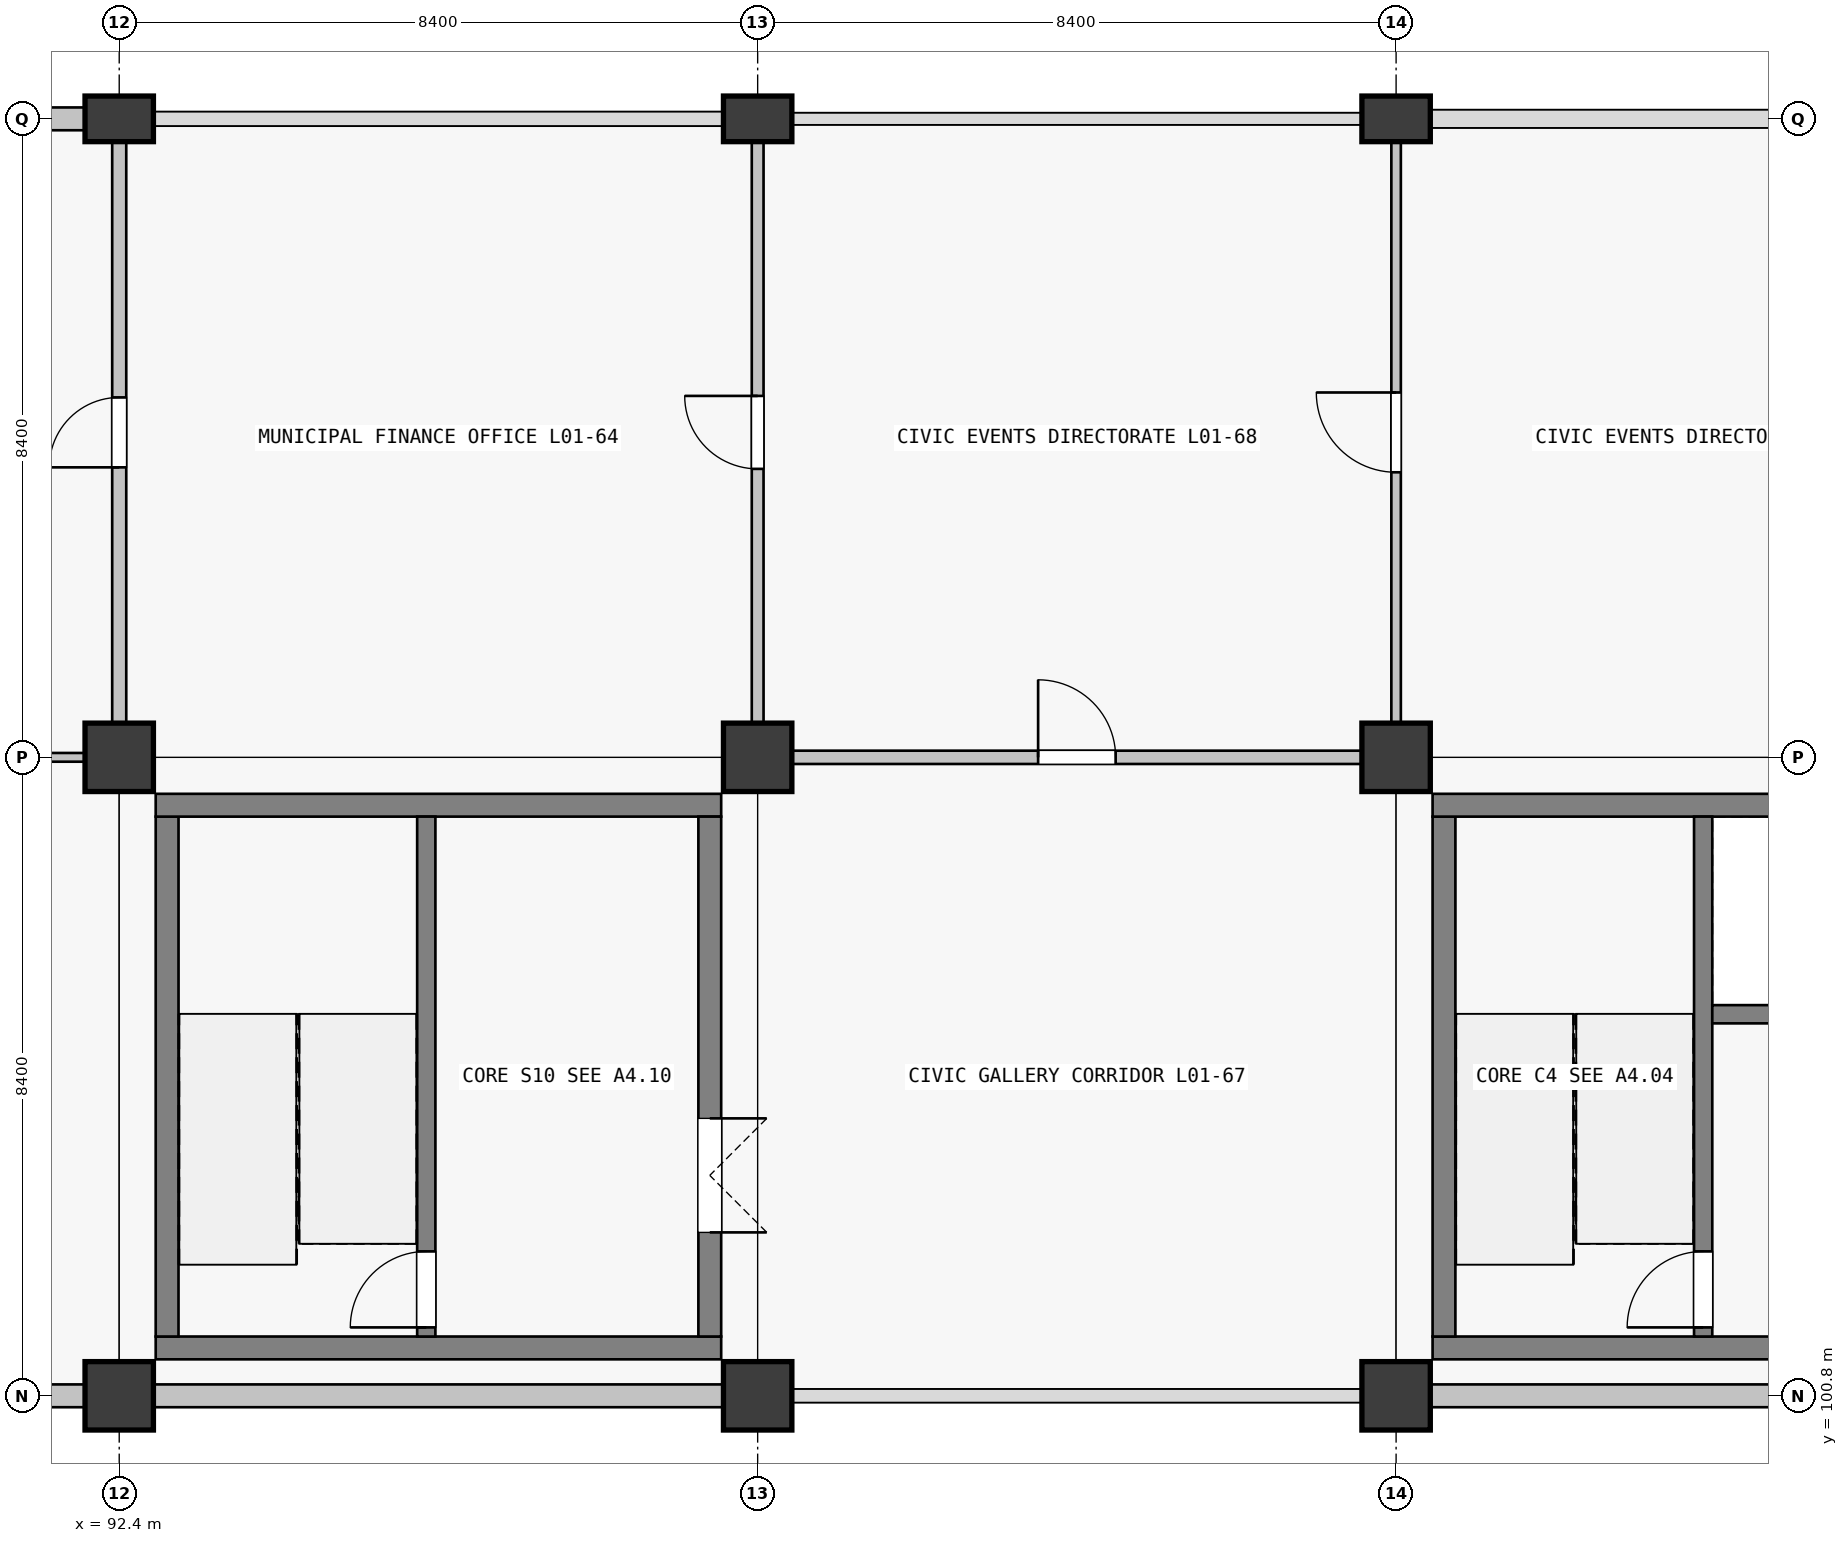
"""IFC4 building model, lengths in metres.
Left out: names, types, materials, properties, quantities, classifications, styles, units other than length and angle.
Written with IfcOpenShell. Run it as: python <this file> out.ifc"""

import sys

from ifc_helpers import new_model, si_unit, direction, frame, frame_2d, origin, origin_2d, place, context, subcontext, project, spatial, rectangle, extrude, element, fill, save


model = new_model("IFC4")
c1 = context("Model", 3, precision=1e-05, world=origin(), true_north=direction((0.0, 1.0)))
c2 = subcontext(c1, "Body", "Model", "MODEL_VIEW")
j1 = project(units=[si_unit("LENGTHUNIT", "METRE"), si_unit("PLANEANGLEUNIT", "RADIAN")], contexts=[c1])
p1 = place(None, origin())
s1 = spatial("IfcSite", under=j1, at=p1, CompositionType="ELEMENT")
p2 = place(p1, origin())
s2 = spatial("IfcBuilding", under=s1, at=p2, CompositionType="ELEMENT")
p3 = place(p2, frame((0.0, 0.0, 5.76)))
s3 = spatial("IfcBuildingStorey", under=s2, at=p3, CompositionType="ELEMENT", Elevation=5.76)
for number, where, z_axis, x_axis in (
    (1, (92.4, 100.8, 0.0), (0.0, 0.0, 1.0), (1.0, 0.0, 0.0)),
    (2, (92.4, 109.2, 0.0), (0.0, 0.0, 1.0), (1.0, 0.0, 0.0)),
):
    element("IfcColumn", number, at=place(p3, frame(where, z_axis=z_axis, x_axis=x_axis)), inside=s3, PredefinedType="COLUMN", context=c2, shape_type="SweptSolid", body=[
        extrude(rectangle(XDim=0.9, YDim=0.9, at=origin_2d()), origin(), (0.0, 0.0, 1.0), 4.5),
    ])
p4 = place(p3, frame((92.4, 117.6, 0.0), z_axis=(0.0, 0.0, 1.0), x_axis=(1.0, 0.0, 0.0)))
e3 = element("IfcColumn", 3, at=p4, inside=s3, PredefinedType="COLUMN", context=c2, shape_type="SweptSolid", body=[
    extrude(rectangle(XDim=0.9, YDim=0.6, at=origin_2d()), origin(), (0.0, 0.0, 1.0), 4.5),
])
for number, where, z_axis, x_axis in (
    (4, (100.8, 100.8, 0.0), (0.0, 0.0, 1.0), (1.0, 0.0, 0.0)),
    (5, (100.8, 109.2, 0.0), (0.0, 0.0, 1.0), (1.0, 0.0, 0.0)),
):
    element("IfcColumn", number, at=place(p3, frame(where, z_axis=z_axis, x_axis=x_axis)), inside=s3, PredefinedType="COLUMN", context=c2, shape_type="SweptSolid", body=[
        extrude(rectangle(XDim=0.9, YDim=0.9, at=origin_2d()), origin(), (0.0, 0.0, 1.0), 4.5),
    ])
p5 = place(p3, frame((100.8, 117.6, 0.0), z_axis=(0.0, 0.0, 1.0), x_axis=(1.0, 0.0, 0.0)))
e6 = element("IfcColumn", 6, at=p5, inside=s3, PredefinedType="COLUMN", context=c2, shape_type="SweptSolid", body=[
    extrude(rectangle(XDim=0.9, YDim=0.6, at=origin_2d()), origin(), (0.0, 0.0, 1.0), 4.5),
])
for number, where, z_axis, x_axis in (
    (7, (109.2, 100.8, 0.0), (0.0, 0.0, 1.0), (1.0, 0.0, 0.0)),
    (8, (109.2, 109.2, 0.0), (0.0, 0.0, 1.0), (1.0, 0.0, 0.0)),
):
    element("IfcColumn", number, at=place(p3, frame(where, z_axis=z_axis, x_axis=x_axis)), inside=s3, PredefinedType="COLUMN", context=c2, shape_type="SweptSolid", body=[
        extrude(rectangle(XDim=0.9, YDim=0.9, at=origin_2d()), origin(), (0.0, 0.0, 1.0), 4.5),
    ])
p6 = place(p3, frame((109.2, 117.6, 0.0), z_axis=(0.0, 0.0, 1.0), x_axis=(1.0, 0.0, 0.0)))
e9 = element("IfcColumn", 9, at=p6, inside=s3, PredefinedType="COLUMN", context=c2, shape_type="SweptSolid", body=[
    extrude(rectangle(XDim=0.9, YDim=0.6, at=origin_2d()), origin(), (0.0, 0.0, 1.0), 4.5),
])
p7 = place(p3, frame((91.949, 100.8, 0.0), z_axis=(0.0, 0.0, 1.0), x_axis=(-1.0, 0.0, 0.0)))
e10 = element("IfcWall", 10, at=p7, inside=s3, PredefinedType="SOLIDWALL", context=c2, shape_type="SweptSolid", body=[
    extrude(rectangle(XDim=7.498, YDim=0.3, at=frame_2d((3.749, 0.0))), origin(), (0.0, 0.0, 1.0), 3.4),
])
p8 = place(p7, frame((2.249, 0.0, 0.9)))
e11 = element("IfcOpeningElement", 11, at=p8, cuts=e10, PredefinedType="OPENING", context=c2, shape_type="SweptSolid", body=[
    extrude(rectangle(XDim=3.0, YDim=1.2, at=frame_2d((1.5, 0.6))), frame((0.0, 0.15, 0.0), z_axis=(0.0, -1.0, 0.0), x_axis=(1.0, 0.0, 0.0)), (0.0, 0.0, 1.0), 0.3),
])
p9 = place(p3, frame((84.451, 117.6, 0.0), z_axis=(0.0, 0.0, 1.0), x_axis=(1.0, 0.0, 0.0)))
e12 = element("IfcWall", 12, at=p9, inside=s3, PredefinedType="SOLIDWALL", context=c2, shape_type="SweptSolid", body=[
    extrude(rectangle(XDim=7.498, YDim=0.3, at=frame_2d((3.749, 0.0))), origin(), (0.0, 0.0, 1.0), 3.4),
])
p10 = place(p9, frame((2.399, 0.0, 0.9)))
e13 = element("IfcOpeningElement", 13, at=p10, cuts=e12, PredefinedType="OPENING", context=c2, shape_type="SweptSolid", body=[
    extrude(rectangle(XDim=2.7, YDim=1.2, at=frame_2d((1.35, 0.6))), frame((0.0, 0.15, 0.0), z_axis=(0.0, -1.0, 0.0), x_axis=(1.0, 0.0, 0.0)), (0.0, 0.0, 1.0), 0.3),
])
for number, where, z_axis, x_axis in (
    (14, (100.349, 100.8, 0.0), (0.0, 0.0, 1.0), (-1.0, 0.0, 0.0)),
    (15, (117.149, 100.8, 0.0), (0.0, 0.0, 1.0), (-1.0, 0.0, 0.0)),
):
    element("IfcWall", number, at=place(p3, frame(where, z_axis=z_axis, x_axis=x_axis)), inside=s3, PredefinedType="SOLIDWALL", context=c2, shape_type="SweptSolid", body=[
        extrude(rectangle(XDim=7.498, YDim=0.3, at=frame_2d((3.749, 0.0))), origin(), (0.0, 0.0, 1.0), 3.4),
    ])
p11 = place(p3, frame((117.12, 101.43, 0.0), z_axis=(0.0, 0.0, 1.0), x_axis=(-1.0, 0.0, 0.0)))
e16 = element("IfcWall", 16, at=p11, inside=s3, PredefinedType="SHEAR", context=c2, shape_type="SweptSolid", body=[
    extrude(rectangle(XDim=7.44, YDim=0.3, at=frame_2d((3.72, 0.0))), origin(), (0.0, 0.0, 1.0), 4.5),
])
p12 = place(p3, frame((109.83, 101.58, 0.0), z_axis=(0.0, 0.0, 1.0), x_axis=(0.0, 1.0, 0.0)))
e17 = element("IfcWall", 17, at=p12, inside=s3, PredefinedType="SHEAR", context=c2, shape_type="SweptSolid", body=[
    extrude(rectangle(XDim=6.84, YDim=0.3, at=frame_2d((3.42, 0.0))), origin(), (0.0, 0.0, 1.0), 4.5),
])
p13 = place(p3, frame((109.68, 108.57, 0.0), z_axis=(0.0, 0.0, 1.0), x_axis=(1.0, 0.0, 0.0)))
e18 = element("IfcWall", 18, at=p13, inside=s3, PredefinedType="SHEAR", context=c2, shape_type="SweptSolid", body=[
    extrude(rectangle(XDim=7.44, YDim=0.3, at=frame_2d((3.72, 0.0))), origin(), (0.0, 0.0, 1.0), 4.5),
])
p14 = place(p3, frame((113.24, 101.58, 0.0), z_axis=(0.0, 0.0, 1.0), x_axis=(0.0, 1.0, 0.0)))
e19 = element("IfcWall", 19, at=p14, inside=s3, PredefinedType="SHEAR", context=c2, shape_type="SweptSolid", body=[
    extrude(rectangle(XDim=6.84, YDim=0.24, at=frame_2d((3.42, 0.0))), origin(), (0.0, 0.0, 1.0), 4.5),
])
p15 = place(p14, frame((0.12, 0.0, 0.0)))
e20 = element("IfcOpeningElement", 20, at=p15, cuts=e19, PredefinedType="OPENING", context=c2, shape_type="SweptSolid", body=[
    extrude(rectangle(XDim=1.0, YDim=2.15, at=frame_2d((0.5, 1.075))), frame((0.0, 0.12, 0.0), z_axis=(0.0, -1.0, 0.0), x_axis=(1.0, 0.0, 0.0)), (0.0, 0.0, 1.0), 0.24),
])
p16 = place(p3, frame((113.36, 105.82, 0.0), z_axis=(0.0, 0.0, 1.0), x_axis=(1.0, 0.0, 0.0)))
e21 = element("IfcWall", 21, at=p16, inside=s3, PredefinedType="SHEAR", context=c2, shape_type="SweptSolid", body=[
    extrude(rectangle(XDim=3.46, YDim=0.24, at=frame_2d((1.73, 0.0))), origin(), (0.0, 0.0, 1.0), 4.5),
])
p17 = place(p16, frame((1.13, 0.0, 0.0)))
e22 = element("IfcOpeningElement", 22, at=p17, cuts=e21, PredefinedType="OPENING", context=c2, shape_type="SweptSolid", body=[
    extrude(rectangle(XDim=1.2, YDim=2.2, at=frame_2d((0.6, 1.1))), frame((0.0, 0.12, 0.0), z_axis=(0.0, -1.0, 0.0), x_axis=(1.0, 0.0, 0.0)), (0.0, 0.0, 1.0), 0.24),
])
p18 = place(p3, frame((100.32, 101.43, 0.0), z_axis=(0.0, 0.0, 1.0), x_axis=(-1.0, 0.0, 0.0)))
e23 = element("IfcWall", 23, at=p18, inside=s3, PredefinedType="SHEAR", context=c2, shape_type="SweptSolid", body=[
    extrude(rectangle(XDim=7.44, YDim=0.3, at=frame_2d((3.72, 0.0))), origin(), (0.0, 0.0, 1.0), 4.5),
])
p19 = place(p3, frame((93.03, 101.58, 0.0), z_axis=(0.0, 0.0, 1.0), x_axis=(0.0, 1.0, 0.0)))
e24 = element("IfcWall", 24, at=p19, inside=s3, PredefinedType="SHEAR", context=c2, shape_type="SweptSolid", body=[
    extrude(rectangle(XDim=6.84, YDim=0.3, at=frame_2d((3.42, 0.0))), origin(), (0.0, 0.0, 1.0), 4.5),
])
p20 = place(p3, frame((92.88, 108.57, 0.0), z_axis=(0.0, 0.0, 1.0), x_axis=(1.0, 0.0, 0.0)))
e25 = element("IfcWall", 25, at=p20, inside=s3, PredefinedType="SHEAR", context=c2, shape_type="SweptSolid", body=[
    extrude(rectangle(XDim=7.44, YDim=0.3, at=frame_2d((3.72, 0.0))), origin(), (0.0, 0.0, 1.0), 4.5),
])
p21 = place(p3, frame((100.17, 108.42, 0.0), z_axis=(0.0, 0.0, 1.0), x_axis=(0.0, -1.0, 0.0)))
e26 = element("IfcWall", 26, at=p21, inside=s3, PredefinedType="SHEAR", context=c2, shape_type="SweptSolid", body=[
    extrude(rectangle(XDim=6.84, YDim=0.3, at=frame_2d((3.42, 0.0))), origin(), (0.0, 0.0, 1.0), 4.5),
])
p22 = place(p21, frame((3.97, 0.0, 0.0)))
e27 = element("IfcOpeningElement", 27, at=p22, cuts=e26, PredefinedType="OPENING", context=c2, shape_type="SweptSolid", body=[
    extrude(rectangle(XDim=1.5, YDim=2.15, at=frame_2d((0.75, 1.075))), frame((0.0, 0.15, 0.0), z_axis=(0.0, -1.0, 0.0), x_axis=(1.0, 0.0, 0.0)), (0.0, 0.0, 1.0), 0.3),
])
p23 = place(p3, frame((96.44, 101.58, 0.0), z_axis=(0.0, 0.0, 1.0), x_axis=(0.0, 1.0, 0.0)))
e28 = element("IfcWall", 28, at=p23, inside=s3, PredefinedType="SHEAR", context=c2, shape_type="SweptSolid", body=[
    extrude(rectangle(XDim=6.84, YDim=0.24, at=frame_2d((3.42, 0.0))), origin(), (0.0, 0.0, 1.0), 4.5),
])
p24 = place(p23, frame((0.12, 0.0, 0.0)))
e29 = element("IfcOpeningElement", 29, at=p24, cuts=e28, PredefinedType="OPENING", context=c2, shape_type="SweptSolid", body=[
    extrude(rectangle(XDim=1.0, YDim=2.15, at=frame_2d((0.5, 1.075))), frame((0.0, 0.12, 0.0), z_axis=(0.0, -1.0, 0.0), x_axis=(1.0, 0.0, 0.0)), (0.0, 0.0, 1.0), 0.24),
])
p25 = place(p3, frame((84.452, 109.2, 0.0), z_axis=(0.0, 0.0, 1.0), x_axis=(1.0, 0.0, 0.0)))
e30 = element("IfcWall", 30, at=p25, inside=s3, PredefinedType="PARTITIONING", context=c2, shape_type="SweptSolid", body=[
    extrude(rectangle(XDim=7.496, YDim=0.115, at=frame_2d((3.748, 0.0))), origin(), (0.0, 0.0, 1.0), 2.4),
])
p26 = place(p25, frame((3.218, 0.0, 0.0)))
e31 = element("IfcOpeningElement", 31, at=p26, cuts=e30, PredefinedType="OPENING", context=c2, shape_type="SweptSolid", body=[
    extrude(rectangle(XDim=1.06, YDim=2.22, at=frame_2d((0.53, 1.11))), frame((0.0, 0.058, 0.0), z_axis=(0.0, -1.0, 0.0), x_axis=(1.0, 0.0, 0.0)), (0.0, 0.0, 1.0), 0.115),
])
p27 = place(p3, frame((101.252, 109.2, 0.0), z_axis=(0.0, 0.0, 1.0), x_axis=(1.0, 0.0, 0.0)))
e32 = element("IfcWall", 32, at=p27, inside=s3, PredefinedType="PARTITIONING", context=c2, shape_type="SweptSolid", body=[
    extrude(rectangle(XDim=7.496, YDim=0.175, at=frame_2d((3.748, 0.0))), origin(), (0.0, 0.0, 1.0), 2.4),
])
p28 = place(p27, frame((3.238, 0.0, 0.0)))
e33 = element("IfcOpeningElement", 33, at=p28, cuts=e32, PredefinedType="OPENING", context=c2, shape_type="SweptSolid", body=[
    extrude(rectangle(XDim=1.02, YDim=2.2, at=frame_2d((0.51, 1.1))), frame((0.0, 0.087, 0.0), z_axis=(0.0, -1.0, 0.0), x_axis=(1.0, 0.0, 0.0)), (0.0, 0.0, 1.0), 0.175),
])
p29 = place(p3, frame((92.4, 109.652, 0.0), z_axis=(0.0, 0.0, 1.0), x_axis=(0.0, 1.0, 0.0)))
e34 = element("IfcWall", 34, at=p29, inside=s3, PredefinedType="PARTITIONING", context=c2, shape_type="SweptSolid", body=[
    extrude(rectangle(XDim=7.646, YDim=0.185, at=frame_2d((3.823, 0.0))), origin(), (0.0, 0.0, 1.0), 2.4),
])
p30 = place(p29, frame((3.363, 0.0, 0.0)))
e35 = element("IfcOpeningElement", 35, at=p30, cuts=e34, PredefinedType="OPENING", context=c2, shape_type="SweptSolid", body=[
    extrude(rectangle(XDim=0.92, YDim=2.15, at=frame_2d((0.46, 1.075))), frame((0.0, 0.093, 0.0), z_axis=(0.0, -1.0, 0.0), x_axis=(1.0, 0.0, 0.0)), (0.0, 0.0, 1.0), 0.185),
])
p31 = place(p3, frame((100.8, 109.652, 0.0), z_axis=(0.0, 0.0, 1.0), x_axis=(0.0, 1.0, 0.0)))
e36 = element("IfcWall", 36, at=p31, inside=s3, PredefinedType="PARTITIONING", context=c2, shape_type="SweptSolid", body=[
    extrude(rectangle(XDim=7.646, YDim=0.155, at=frame_2d((3.823, 0.0))), origin(), (0.0, 0.0, 1.0), 2.4),
])
p32 = place(p31, frame((3.343, 0.0, 0.0)))
e37 = element("IfcOpeningElement", 37, at=p32, cuts=e36, PredefinedType="OPENING", context=c2, shape_type="SweptSolid", body=[
    extrude(rectangle(XDim=0.96, YDim=2.18, at=frame_2d((0.48, 1.09))), frame((0.0, 0.078, 0.0), z_axis=(0.0, -1.0, 0.0), x_axis=(1.0, 0.0, 0.0)), (0.0, 0.0, 1.0), 0.155),
])
p33 = place(p3, frame((109.2, 109.652, 0.0), z_axis=(0.0, 0.0, 1.0), x_axis=(0.0, 1.0, 0.0)))
e38 = element("IfcWall", 38, at=p33, inside=s3, PredefinedType="PARTITIONING", context=c2, shape_type="SweptSolid", body=[
    extrude(rectangle(XDim=7.646, YDim=0.125, at=frame_2d((3.823, 0.0))), origin(), (0.0, 0.0, 1.0), 2.4),
])
p34 = place(p33, frame((3.298, 0.0, 0.0)))
e39 = element("IfcOpeningElement", 39, at=p34, cuts=e38, PredefinedType="OPENING", context=c2, shape_type="SweptSolid", body=[
    extrude(rectangle(XDim=1.05, YDim=2.12, at=frame_2d((0.525, 1.06))), frame((0.0, 0.062, 0.0), z_axis=(0.0, -1.0, 0.0), x_axis=(1.0, 0.0, 0.0)), (0.0, 0.0, 1.0), 0.125),
])
p35 = place(p15, origin())
e40 = element("IfcDoor", 40, at=p35, inside=s3, OperationType="SINGLE_SWING_LEFT", PredefinedType="DOOR", context=c2, shape_type="SweptSolid", body=[
    extrude(rectangle(XDim=1.0, YDim=2.15, at=frame_2d((0.5, 1.075))), frame((0.0, 0.025, 0.0), z_axis=(0.0, -1.0, 0.0), x_axis=(1.0, 0.0, 0.0)), (0.0, 0.0, 1.0), 0.05),
])
fill(e20, e40)
p36 = place(p24, origin())
e41 = element("IfcDoor", 41, at=p36, inside=s3, OperationType="SINGLE_SWING_LEFT", PredefinedType="DOOR", context=c2, shape_type="SweptSolid", body=[
    extrude(rectangle(XDim=1.0, YDim=2.15, at=frame_2d((0.5, 1.075))), frame((0.0, 0.025, 0.0), z_axis=(0.0, -1.0, 0.0), x_axis=(1.0, 0.0, 0.0)), (0.0, 0.0, 1.0), 0.05),
])
fill(e29, e41)
p37 = place(p22, origin())
e42 = element("IfcDoor", 42, at=p37, inside=s3, OperationType="DOUBLE_DOOR_SINGLE_SWING", PredefinedType="DOOR", context=c2, shape_type="SweptSolid", body=[
    extrude(rectangle(XDim=1.5, YDim=2.15, at=frame_2d((0.75, 1.075))), frame((0.0, 0.025, 0.0), z_axis=(0.0, -1.0, 0.0), x_axis=(1.0, 0.0, 0.0)), (0.0, 0.0, 1.0), 0.05),
])
fill(e27, e42)
p38 = place(p28, origin())
e43 = element("IfcDoor", 43, at=p38, inside=s3, OperationType="SINGLE_SWING_LEFT", PredefinedType="DOOR", context=c2, shape_type="SweptSolid", body=[
    extrude(rectangle(XDim=1.02, YDim=2.2, at=frame_2d((0.51, 1.1))), frame((0.0, 0.025, 0.0), z_axis=(0.0, -1.0, 0.0), x_axis=(1.0, 0.0, 0.0)), (0.0, 0.0, 1.0), 0.05),
])
fill(e33, e43)
p39 = place(p30, origin())
e44 = element("IfcDoor", 44, at=p39, inside=s3, OperationType="SINGLE_SWING_LEFT", PredefinedType="DOOR", context=c2, shape_type="SweptSolid", body=[
    extrude(rectangle(XDim=0.92, YDim=2.15, at=frame_2d((0.46, 1.075))), frame((0.0, 0.025, 0.0), z_axis=(0.0, -1.0, 0.0), x_axis=(1.0, 0.0, 0.0)), (0.0, 0.0, 1.0), 0.05),
])
fill(e35, e44)
p40 = place(p34, origin())
e45 = element("IfcDoor", 45, at=p40, inside=s3, OperationType="SINGLE_SWING_RIGHT", PredefinedType="DOOR", context=c2, shape_type="SweptSolid", body=[
    extrude(rectangle(XDim=1.05, YDim=2.12, at=frame_2d((0.525, 1.06))), frame((0.0, 0.025, 0.0), z_axis=(0.0, -1.0, 0.0), x_axis=(1.0, 0.0, 0.0)), (0.0, 0.0, 1.0), 0.05),
])
fill(e39, e45)
p41 = place(p32, origin())
e46 = element("IfcDoor", 46, at=p41, inside=s3, OperationType="SINGLE_SWING_RIGHT", PredefinedType="DOOR", context=c2, shape_type="SweptSolid", body=[
    extrude(rectangle(XDim=0.96, YDim=2.18, at=frame_2d((0.48, 1.09))), frame((0.0, 0.025, 0.0), z_axis=(0.0, -1.0, 0.0), x_axis=(1.0, 0.0, 0.0)), (0.0, 0.0, 1.0), 0.05),
])
fill(e37, e46)
save(model, sys.argv[1])
